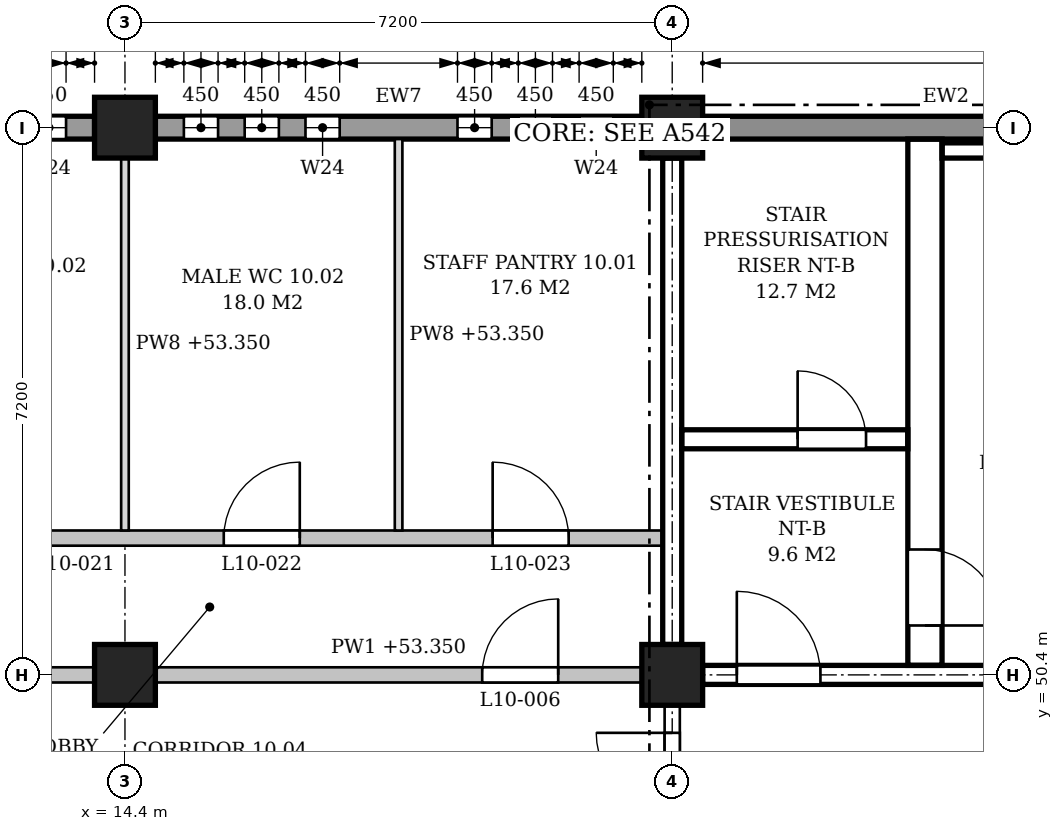
"""IFC4 building model, lengths in metres.
Left out: names, types, materials, properties, quantities, classifications, styles, units other than length and angle.
Written with IfcOpenShell. Run it as: python <this file> out.ifc"""

import sys

from ifc_helpers import new_model, si_unit, direction, frame, frame_2d, origin, origin_2d, place, context, subcontext, project, spatial, polyline, rectangle, outline, extrude, element, fill, save


model = new_model("IFC4")
c1 = context("Model", 3, precision=1e-05, world=origin(), true_north=direction((0.0, 1.0)))
c2 = subcontext(c1, "Body", "Model", "MODEL_VIEW")
j1 = project(units=[si_unit("LENGTHUNIT", "METRE"), si_unit("PLANEANGLEUNIT", "RADIAN")], contexts=[c1])
p1 = place(None, origin())
s1 = spatial("IfcSite", under=j1, at=p1, CompositionType="ELEMENT")
p2 = place(p1, origin())
s2 = spatial("IfcBuilding", under=s1, at=p2, CompositionType="ELEMENT")
p3 = place(p2, frame((0.0, 0.0, 49.8)))
s3 = spatial("IfcBuildingStorey", under=s2, at=p3, CompositionType="ELEMENT", Elevation=49.8)
for number, where, z_axis, x_axis in (
    (1, (14.4, 50.4, 0.0), (0.0, 0.0, 1.0), (1.0, 0.0, 0.0)),
    (2, (14.4, 57.6, 0.0), (0.0, 0.0, 1.0), (1.0, 0.0, 0.0)),
    (3, (21.6, 50.4, 0.0), (0.0, 0.0, 1.0), (1.0, 0.0, 0.0)),
    (4, (21.6, 57.6, 0.0), (0.0, 0.0, 1.0), (1.0, 0.0, 0.0)),
):
    element("IfcColumn", number, at=place(p3, frame(where, z_axis=z_axis, x_axis=x_axis)), inside=s3, PredefinedType="COLUMN", context=c2, shape_type="SweptSolid", body=[
        extrude(rectangle(XDim=0.8, YDim=0.8, at=origin_2d()), origin(), (0.0, 0.0, 1.0), 4.5),
    ])
p4 = place(p3, frame((28.4, 57.6, 0.0), z_axis=(0.0, 0.0, 1.0), x_axis=(-1.0, 0.0, 0.0)))
e5 = element("IfcWall", 5, at=p4, inside=s3, PredefinedType="STANDARD", context=c2, shape_type="SweptSolid", body=[
    extrude(rectangle(XDim=6.4, YDim=0.3, at=frame_2d((3.2, 0.0))), origin(), (0.0, 0.0, 1.0), 3.6),
])
p5 = place(p4, frame((0.95, 0.0, 0.9)))
e6 = element("IfcOpeningElement", 6, at=p5, cuts=e5, PredefinedType="OPENING", context=c2, shape_type="SweptSolid", body=[
    extrude(outline(polyline([(0.0, 0.0), (0.9, 0.0), (0.9, 2.15), (0.45, 2.6), (0.0, 2.15), (0.0, 0.0)])), frame((0.0, 0.16, 0.0), z_axis=(0.0, -1.0, 0.0), x_axis=(1.0, 0.0, 0.0)), (0.0, 0.0, 1.0), 0.32),
])
p6 = place(p3, frame((21.2, 57.6, 0.0), z_axis=(0.0, 0.0, 1.0), x_axis=(-1.0, 0.0, 0.0)))
e7 = element("IfcWall", 7, at=p6, inside=s3, PredefinedType="STANDARD", context=c2, shape_type="SweptSolid", body=[
    extrude(rectangle(XDim=6.4, YDim=0.3, at=frame_2d((3.2, 0.0))), origin(), (0.0, 0.0, 1.0), 3.6),
])
p7 = place(p6, frame((0.375, 0.0, 0.9)))
e8 = element("IfcOpeningElement", 8, at=p7, cuts=e7, PredefinedType="OPENING", context=c2, shape_type="SweptSolid", body=[
    extrude(outline(polyline([(0.0, 0.0), (0.45, 0.0), (0.45, 2.35), (0.225, 2.6), (0.0, 2.35), (0.0, 0.0)])), frame((0.0, 0.16, 0.0), z_axis=(0.0, -1.0, 0.0), x_axis=(1.0, 0.0, 0.0)), (0.0, 0.0, 1.0), 0.32),
])
p8 = place(p6, frame((1.175, 0.0, 0.9)))
e9 = element("IfcOpeningElement", 9, at=p8, cuts=e7, PredefinedType="OPENING", context=c2, shape_type="SweptSolid", body=[
    extrude(outline(polyline([(0.0, 0.0), (0.45, 0.0), (0.45, 2.35), (0.225, 2.6), (0.0, 2.35), (0.0, 0.0)])), frame((0.0, 0.16, 0.0), z_axis=(0.0, -1.0, 0.0), x_axis=(1.0, 0.0, 0.0)), (0.0, 0.0, 1.0), 0.32),
])
p9 = place(p6, frame((1.975, 0.0, 0.9)))
e10 = element("IfcOpeningElement", 10, at=p9, cuts=e7, PredefinedType="OPENING", context=c2, shape_type="SweptSolid", body=[
    extrude(outline(polyline([(0.0, 0.0), (0.45, 0.0), (0.45, 2.35), (0.225, 2.6), (0.0, 2.35), (0.0, 0.0)])), frame((0.0, 0.16, 0.0), z_axis=(0.0, -1.0, 0.0), x_axis=(1.0, 0.0, 0.0)), (0.0, 0.0, 1.0), 0.32),
])
p10 = place(p6, frame((3.975, 0.0, 0.9)))
e11 = element("IfcOpeningElement", 11, at=p10, cuts=e7, PredefinedType="OPENING", context=c2, shape_type="SweptSolid", body=[
    extrude(outline(polyline([(0.0, 0.0), (0.45, 0.0), (0.45, 2.35), (0.225, 2.6), (0.0, 2.35), (0.0, 0.0)])), frame((0.0, 0.16, 0.0), z_axis=(0.0, -1.0, 0.0), x_axis=(1.0, 0.0, 0.0)), (0.0, 0.0, 1.0), 0.32),
])
p11 = place(p6, frame((4.775, 0.0, 0.9)))
e12 = element("IfcOpeningElement", 12, at=p11, cuts=e7, PredefinedType="OPENING", context=c2, shape_type="SweptSolid", body=[
    extrude(outline(polyline([(0.0, 0.0), (0.45, 0.0), (0.45, 2.35), (0.225, 2.6), (0.0, 2.35), (0.0, 0.0)])), frame((0.0, 0.16, 0.0), z_axis=(0.0, -1.0, 0.0), x_axis=(1.0, 0.0, 0.0)), (0.0, 0.0, 1.0), 0.32),
])
p12 = place(p6, frame((5.575, 0.0, 0.9)))
e13 = element("IfcOpeningElement", 13, at=p12, cuts=e7, PredefinedType="OPENING", context=c2, shape_type="SweptSolid", body=[
    extrude(outline(polyline([(0.0, 0.0), (0.45, 0.0), (0.45, 2.35), (0.225, 2.6), (0.0, 2.35), (0.0, 0.0)])), frame((0.0, 0.16, 0.0), z_axis=(0.0, -1.0, 0.0), x_axis=(1.0, 0.0, 0.0)), (0.0, 0.0, 1.0), 0.32),
])
p13 = place(p3, frame((14.0, 57.6, 0.0), z_axis=(0.0, 0.0, 1.0), x_axis=(-1.0, 0.0, 0.0)))
e14 = element("IfcWall", 14, at=p13, inside=s3, PredefinedType="STANDARD", context=c2, shape_type="SweptSolid", body=[
    extrude(rectangle(XDim=6.4, YDim=0.3, at=frame_2d((3.2, 0.0))), origin(), (0.0, 0.0, 1.0), 3.6),
])
p14 = place(p13, frame((0.375, 0.0, 0.9)))
e15 = element("IfcOpeningElement", 15, at=p14, cuts=e14, PredefinedType="OPENING", context=c2, shape_type="SweptSolid", body=[
    extrude(outline(polyline([(0.0, 0.0), (0.45, 0.0), (0.45, 2.35), (0.225, 2.6), (0.0, 2.35), (0.0, 0.0)])), frame((0.0, 0.16, 0.0), z_axis=(0.0, -1.0, 0.0), x_axis=(1.0, 0.0, 0.0)), (0.0, 0.0, 1.0), 0.32),
])
p15 = place(p13, frame((1.175, 0.0, 0.9)))
e16 = element("IfcOpeningElement", 16, at=p15, cuts=e14, PredefinedType="OPENING", context=c2, shape_type="SweptSolid", body=[
    extrude(outline(polyline([(0.0, 0.0), (0.45, 0.0), (0.45, 2.35), (0.225, 2.6), (0.0, 2.35), (0.0, 0.0)])), frame((0.0, 0.16, 0.0), z_axis=(0.0, -1.0, 0.0), x_axis=(1.0, 0.0, 0.0)), (0.0, 0.0, 1.0), 0.32),
])
p16 = place(p13, frame((1.975, 0.0, 0.9)))
e17 = element("IfcOpeningElement", 17, at=p16, cuts=e14, PredefinedType="OPENING", context=c2, shape_type="SweptSolid", body=[
    extrude(outline(polyline([(0.0, 0.0), (0.45, 0.0), (0.45, 2.35), (0.225, 2.6), (0.0, 2.35), (0.0, 0.0)])), frame((0.0, 0.16, 0.0), z_axis=(0.0, -1.0, 0.0), x_axis=(1.0, 0.0, 0.0)), (0.0, 0.0, 1.0), 0.32),
])
p17 = place(p13, frame((3.975, 0.0, 0.9)))
e18 = element("IfcOpeningElement", 18, at=p17, cuts=e14, PredefinedType="OPENING", context=c2, shape_type="SweptSolid", body=[
    extrude(outline(polyline([(0.0, 0.0), (0.45, 0.0), (0.45, 2.35), (0.225, 2.6), (0.0, 2.35), (0.0, 0.0)])), frame((0.0, 0.16, 0.0), z_axis=(0.0, -1.0, 0.0), x_axis=(1.0, 0.0, 0.0)), (0.0, 0.0, 1.0), 0.32),
])
p18 = place(p13, frame((4.775, 0.0, 0.9)))
e19 = element("IfcOpeningElement", 19, at=p18, cuts=e14, PredefinedType="OPENING", context=c2, shape_type="SweptSolid", body=[
    extrude(outline(polyline([(0.0, 0.0), (0.45, 0.0), (0.45, 2.35), (0.225, 2.6), (0.0, 2.35), (0.0, 0.0)])), frame((0.0, 0.16, 0.0), z_axis=(0.0, -1.0, 0.0), x_axis=(1.0, 0.0, 0.0)), (0.0, 0.0, 1.0), 0.32),
])
p19 = place(p13, frame((5.575, 0.0, 0.9)))
e20 = element("IfcOpeningElement", 20, at=p19, cuts=e14, PredefinedType="OPENING", context=c2, shape_type="SweptSolid", body=[
    extrude(outline(polyline([(0.0, 0.0), (0.45, 0.0), (0.45, 2.35), (0.225, 2.6), (0.0, 2.35), (0.0, 0.0)])), frame((0.0, 0.16, 0.0), z_axis=(0.0, -1.0, 0.0), x_axis=(1.0, 0.0, 0.0)), (0.0, 0.0, 1.0), 0.32),
])
p20 = place(p3, frame((22.0, 50.4, 0.0), z_axis=(0.0, 0.0, 1.0), x_axis=(1.0, 0.0, 0.0)))
e21 = element("IfcWall", 21, at=p20, inside=s3, PredefinedType="SHEAR", context=c2, shape_type="SweptSolid", body=[
    extrude(rectangle(XDim=6.4, YDim=0.25, at=frame_2d((3.2, 0.0))), origin(), (0.0, 0.0, 1.0), 3.55),
])
p21 = place(p20, frame((0.45, 0.0, 0.0)))
e22 = element("IfcOpeningElement", 22, at=p21, cuts=e21, PredefinedType="OPENING", context=c2, shape_type="SweptSolid", body=[
    extrude(rectangle(XDim=1.1, YDim=2.1, at=frame_2d((0.55, 1.05))), frame((0.0, 0.135, 0.0), z_axis=(0.0, -1.0, 0.0), x_axis=(1.0, 0.0, 0.0)), (0.0, 0.0, 1.0), 0.27),
])
p22 = place(p3, frame((21.6, 50.8, 0.0), z_axis=(0.0, 0.0, 1.0), x_axis=(0.0, 1.0, 0.0)))
e23 = element("IfcWall", 23, at=p22, inside=s3, PredefinedType="SHEAR", context=c2, shape_type="SweptSolid", body=[
    extrude(rectangle(XDim=6.4, YDim=0.25, at=frame_2d((3.2, 0.0))), origin(), (0.0, 0.0, 1.0), 3.55),
])
p23 = place(p3, frame((25.15, 57.3, -0.25), z_axis=(0.0, 0.0, 1.0), x_axis=(1.0, 0.0, 0.0)))
e24 = element("IfcWall", 24, at=p23, inside=s3, PredefinedType="SHEAR", context=c2, shape_type="SweptSolid", body=[
    extrude(rectangle(XDim=1.4, YDim=0.2, at=frame_2d((0.7, 0.0))), origin(), (0.0, 0.0, 1.0), 4.45),
])
p24 = place(p3, frame((24.925, 50.525, 0.0), z_axis=(0.0, 0.0, 1.0), x_axis=(0.0, 1.0, 0.0)))
e25 = element("IfcWall", 25, at=p24, inside=s3, PredefinedType="SHEAR", context=c2, shape_type="SweptSolid", body=[
    extrude(rectangle(XDim=6.925, YDim=0.45, at=frame_2d((3.462, 0.0))), origin(), (0.0, 0.0, 1.0), 4.2),
])
p25 = place(p24, frame((0.525, 0.0, 0.0)))
e26 = element("IfcOpeningElement", 26, at=p25, cuts=e25, PredefinedType="OPENING", context=c2, shape_type="SweptSolid", body=[
    extrude(rectangle(XDim=1.0, YDim=2.1, at=frame_2d((0.5, 1.05))), frame((0.0, 0.235, 0.0), z_axis=(0.0, -1.0, 0.0), x_axis=(1.0, 0.0, 0.0)), (0.0, 0.0, 1.0), 0.47),
])
p26 = place(p3, frame((21.725, 53.5, 0.0), z_axis=(0.0, 0.0, 1.0), x_axis=(1.0, 0.0, 0.0)))
e27 = element("IfcWall", 27, at=p26, inside=s3, PredefinedType="SHEAR", context=c2, shape_type="SweptSolid", body=[
    extrude(rectangle(XDim=2.975, YDim=0.25, at=frame_2d((1.487, 0.0))), origin(), (0.0, 0.0, 1.0), 4.2),
])
p27 = place(p26, frame((1.525, 0.0, 0.0)))
e28 = element("IfcOpeningElement", 28, at=p27, cuts=e27, PredefinedType="OPENING", context=c2, shape_type="SweptSolid", body=[
    extrude(rectangle(XDim=0.9, YDim=2.1, at=frame_2d((0.45, 1.05))), frame((0.0, 0.135, 0.0), z_axis=(0.0, -1.0, 0.0), x_axis=(1.0, 0.0, 0.0)), (0.0, 0.0, 1.0), 0.27),
])
p28 = place(p3, frame((7.6, 50.4, 0.0), z_axis=(0.0, 0.0, 1.0), x_axis=(1.0, 0.0, 0.0)))
e29 = element("IfcWall", 29, at=p28, inside=s3, PredefinedType="PARTITIONING", context=c2, shape_type="SweptSolid", body=[
    extrude(rectangle(XDim=6.4, YDim=0.2, at=frame_2d((3.2, 0.0))), origin(), (0.0, 0.0, 1.0), 3.55),
])
p29 = place(p28, frame((2.7, 0.0, 0.0)))
e30 = element("IfcOpeningElement", 30, at=p29, cuts=e29, PredefinedType="OPENING", context=c2, shape_type="SweptSolid", body=[
    extrude(rectangle(XDim=1.0, YDim=2.1, at=frame_2d((0.5, 1.05))), frame((0.0, 0.11, 0.0), z_axis=(0.0, -1.0, 0.0), x_axis=(1.0, 0.0, 0.0)), (0.0, 0.0, 1.0), 0.22),
])
p30 = place(p3, frame((14.8, 50.4, 0.0), z_axis=(0.0, 0.0, 1.0), x_axis=(1.0, 0.0, 0.0)))
e31 = element("IfcWall", 31, at=p30, inside=s3, PredefinedType="PARTITIONING", context=c2, shape_type="SweptSolid", body=[
    extrude(rectangle(XDim=6.4, YDim=0.2, at=frame_2d((3.2, 0.0))), origin(), (0.0, 0.0, 1.0), 3.55),
])
p31 = place(p30, frame((4.3, 0.0, 0.0)))
e32 = element("IfcOpeningElement", 32, at=p31, cuts=e31, PredefinedType="OPENING", context=c2, shape_type="SweptSolid", body=[
    extrude(rectangle(XDim=1.0, YDim=2.1, at=frame_2d((0.5, 1.05))), frame((0.0, 0.11, 0.0), z_axis=(0.0, -1.0, 0.0), x_axis=(1.0, 0.0, 0.0)), (0.0, 0.0, 1.0), 0.22),
])
p32 = place(p3, frame((7.325, 52.2, 0.0), z_axis=(0.0, 0.0, 1.0), x_axis=(1.0, 0.0, 0.0)))
e33 = element("IfcWall", 33, at=p32, inside=s3, PredefinedType="PARTITIONING", context=c2, shape_type="SweptSolid", body=[
    extrude(outline(polyline([(0.0, 0.0), (14.15, 0.0), (14.15, 3.55), (14.05, 3.55), (14.05, 4.2), (7.3, 4.2), (7.3, 3.55), (6.85, 3.55), (6.85, 4.2), (0.1, 4.2), (0.1, 3.55), (0.0, 3.55), (0.0, 0.0)])), frame((0.0, 0.1, 0.0), z_axis=(0.0, -1.0, 0.0), x_axis=(1.0, 0.0, 0.0)), (0.0, 0.0, 1.0), 0.2),
])
p33 = place(p32, frame((1.238, 0.0, 0.0)))
e34 = element("IfcOpeningElement", 34, at=p33, cuts=e33, PredefinedType="OPENING", context=c2, shape_type="SweptSolid", body=[
    extrude(rectangle(XDim=1.0, YDim=2.1, at=frame_2d((0.5, 1.05))), frame((0.0, 0.11, 0.0), z_axis=(0.0, -1.0, 0.0), x_axis=(1.0, 0.0, 0.0)), (0.0, 0.0, 1.0), 0.22),
])
p34 = place(p32, frame((4.775, 0.0, 0.0)))
e35 = element("IfcOpeningElement", 35, at=p34, cuts=e33, PredefinedType="OPENING", context=c2, shape_type="SweptSolid", body=[
    extrude(rectangle(XDim=1.0, YDim=2.1, at=frame_2d((0.5, 1.05))), frame((0.0, 0.11, 0.0), z_axis=(0.0, -1.0, 0.0), x_axis=(1.0, 0.0, 0.0)), (0.0, 0.0, 1.0), 0.22),
])
p35 = place(p32, frame((8.375, 0.0, 0.0)))
e36 = element("IfcOpeningElement", 36, at=p35, cuts=e33, PredefinedType="OPENING", context=c2, shape_type="SweptSolid", body=[
    extrude(rectangle(XDim=1.0, YDim=2.1, at=frame_2d((0.5, 1.05))), frame((0.0, 0.11, 0.0), z_axis=(0.0, -1.0, 0.0), x_axis=(1.0, 0.0, 0.0)), (0.0, 0.0, 1.0), 0.22),
])
p36 = place(p32, frame((11.913, 0.0, 0.0)))
e37 = element("IfcOpeningElement", 37, at=p36, cuts=e33, PredefinedType="OPENING", context=c2, shape_type="SweptSolid", body=[
    extrude(rectangle(XDim=1.0, YDim=2.1, at=frame_2d((0.5, 1.05))), frame((0.0, 0.11, 0.0), z_axis=(0.0, -1.0, 0.0), x_axis=(1.0, 0.0, 0.0)), (0.0, 0.0, 1.0), 0.22),
])
p37 = place(p3, frame((14.4, 52.3, 0.0), z_axis=(0.0, 0.0, 1.0), x_axis=(0.0, 1.0, 0.0)))
e38 = element("IfcWall", 38, at=p37, inside=s3, PredefinedType="PARTITIONING", context=c2, shape_type="SweptSolid", body=[
    extrude(rectangle(XDim=4.9, YDim=0.1, at=frame_2d((2.45, 0.0))), origin(), (0.0, 0.0, 1.0), 3.55),
])
p38 = place(p3, frame((18.0, 52.3, 0.0), z_axis=(0.0, 0.0, 1.0), x_axis=(0.0, 1.0, 0.0)))
e39 = element("IfcWall", 39, at=p38, inside=s3, PredefinedType="PARTITIONING", context=c2, shape_type="SweptSolid", body=[
    extrude(rectangle(XDim=5.15, YDim=0.1, at=frame_2d((2.575, 0.0))), origin(), (0.0, 0.0, 1.0), 3.55),
])
p39 = place(p3, frame((21.6, 47.275, 0.0), z_axis=(0.0, 0.0, 1.0), x_axis=(0.0, 1.0, 0.0)))
e40 = element("IfcWall", 40, at=p39, inside=s3, PredefinedType="PARTITIONING", context=c2, shape_type="SweptSolid", body=[
    extrude(rectangle(XDim=2.725, YDim=0.2, at=frame_2d((1.363, 0.0))), origin(), (0.0, 0.0, 1.0), 3.55),
])
p40 = place(p39, frame((0.363, 0.0, 0.0)))
e41 = element("IfcOpeningElement", 41, at=p40, cuts=e40, PredefinedType="OPENING", context=c2, shape_type="SweptSolid", body=[
    extrude(rectangle(XDim=2.0, YDim=2.4, at=frame_2d((1.0, 1.2))), frame((0.0, 0.11, 0.0), z_axis=(0.0, -1.0, 0.0), x_axis=(1.0, 0.0, 0.0)), (0.0, 0.0, 1.0), 0.22),
])
p41 = place(p7, origin())
e42 = element("IfcWindow", 42, at=p41, inside=s3, PartitioningType="SINGLE_PANEL", PredefinedType="WINDOW", context=c2, shape_type="SweptSolid", body=[
    extrude(outline(polyline([(0.0, 0.0), (0.45, 0.0), (0.45, 2.35), (0.225, 2.6), (0.0, 2.35), (0.0, 0.0)])), frame((0.0, 0.03, 0.0), z_axis=(0.0, -1.0, 0.0), x_axis=(1.0, 0.0, 0.0)), (0.0, 0.0, 1.0), 0.06),
])
fill(e8, e42)
p42 = place(p8, origin())
e43 = element("IfcWindow", 43, at=p42, inside=s3, PartitioningType="SINGLE_PANEL", PredefinedType="WINDOW", context=c2, shape_type="SweptSolid", body=[
    extrude(outline(polyline([(0.0, 0.0), (0.45, 0.0), (0.45, 2.35), (0.225, 2.6), (0.0, 2.35), (0.0, 0.0)])), frame((0.0, 0.03, 0.0), z_axis=(0.0, -1.0, 0.0), x_axis=(1.0, 0.0, 0.0)), (0.0, 0.0, 1.0), 0.06),
])
fill(e9, e43)
p43 = place(p9, origin())
e44 = element("IfcWindow", 44, at=p43, inside=s3, PartitioningType="SINGLE_PANEL", PredefinedType="WINDOW", context=c2, shape_type="SweptSolid", body=[
    extrude(outline(polyline([(0.0, 0.0), (0.45, 0.0), (0.45, 2.35), (0.225, 2.6), (0.0, 2.35), (0.0, 0.0)])), frame((0.0, 0.03, 0.0), z_axis=(0.0, -1.0, 0.0), x_axis=(1.0, 0.0, 0.0)), (0.0, 0.0, 1.0), 0.06),
])
fill(e10, e44)
p44 = place(p10, origin())
e45 = element("IfcWindow", 45, at=p44, inside=s3, PartitioningType="SINGLE_PANEL", PredefinedType="WINDOW", context=c2, shape_type="SweptSolid", body=[
    extrude(outline(polyline([(0.0, 0.0), (0.45, 0.0), (0.45, 2.35), (0.225, 2.6), (0.0, 2.35), (0.0, 0.0)])), frame((0.0, 0.03, 0.0), z_axis=(0.0, -1.0, 0.0), x_axis=(1.0, 0.0, 0.0)), (0.0, 0.0, 1.0), 0.06),
])
fill(e11, e45)
p45 = place(p11, origin())
e46 = element("IfcWindow", 46, at=p45, inside=s3, PartitioningType="SINGLE_PANEL", PredefinedType="WINDOW", context=c2, shape_type="SweptSolid", body=[
    extrude(outline(polyline([(0.0, 0.0), (0.45, 0.0), (0.45, 2.35), (0.225, 2.6), (0.0, 2.35), (0.0, 0.0)])), frame((0.0, 0.03, 0.0), z_axis=(0.0, -1.0, 0.0), x_axis=(1.0, 0.0, 0.0)), (0.0, 0.0, 1.0), 0.06),
])
fill(e12, e46)
p46 = place(p12, origin())
e47 = element("IfcWindow", 47, at=p46, inside=s3, PartitioningType="SINGLE_PANEL", PredefinedType="WINDOW", context=c2, shape_type="SweptSolid", body=[
    extrude(outline(polyline([(0.0, 0.0), (0.45, 0.0), (0.45, 2.35), (0.225, 2.6), (0.0, 2.35), (0.0, 0.0)])), frame((0.0, 0.03, 0.0), z_axis=(0.0, -1.0, 0.0), x_axis=(1.0, 0.0, 0.0)), (0.0, 0.0, 1.0), 0.06),
])
fill(e13, e47)
p47 = place(p14, origin())
e48 = element("IfcWindow", 48, at=p47, inside=s3, PartitioningType="SINGLE_PANEL", PredefinedType="WINDOW", context=c2, shape_type="SweptSolid", body=[
    extrude(outline(polyline([(0.0, 0.0), (0.45, 0.0), (0.45, 2.35), (0.225, 2.6), (0.0, 2.35), (0.0, 0.0)])), frame((0.0, 0.03, 0.0), z_axis=(0.0, -1.0, 0.0), x_axis=(1.0, 0.0, 0.0)), (0.0, 0.0, 1.0), 0.06),
])
fill(e15, e48)
p48 = place(p25, frame((1.0, 0.0, 0.0), z_axis=(0.0, 0.0, 1.0), x_axis=(-1.0, 0.0, 0.0)))
e49 = element("IfcDoor", 49, at=p48, inside=s3, OperationType="SINGLE_SWING_RIGHT", PredefinedType="DOOR", context=c2, shape_type="SweptSolid", body=[
    extrude(rectangle(XDim=1.0, YDim=2.1, at=frame_2d((0.5, 1.05))), frame((0.0, 0.025, 0.0), z_axis=(0.0, -1.0, 0.0), x_axis=(1.0, 0.0, 0.0)), (0.0, 0.0, 1.0), 0.05),
])
fill(e26, e49)
p49 = place(p21, origin())
e50 = element("IfcDoor", 50, at=p49, inside=s3, OperationType="SINGLE_SWING_LEFT", PredefinedType="DOOR", context=c2, shape_type="SweptSolid", body=[
    extrude(rectangle(XDim=1.1, YDim=2.1, at=frame_2d((0.55, 1.05))), frame((0.0, 0.025, 0.0), z_axis=(0.0, -1.0, 0.0), x_axis=(1.0, 0.0, 0.0)), (0.0, 0.0, 1.0), 0.05),
])
fill(e22, e50)
p50 = place(p27, origin())
e51 = element("IfcDoor", 51, at=p50, inside=s3, OperationType="SINGLE_SWING_LEFT", PredefinedType="DOOR", context=c2, shape_type="SweptSolid", body=[
    extrude(rectangle(XDim=0.9, YDim=2.1, at=frame_2d((0.45, 1.05))), frame((0.0, 0.025, 0.0), z_axis=(0.0, -1.0, 0.0), x_axis=(1.0, 0.0, 0.0)), (0.0, 0.0, 1.0), 0.05),
])
fill(e28, e51)
p51 = place(p40, origin())
e52 = element("IfcDoor", 52, at=p51, inside=s3, OperationType="DOUBLE_DOOR_SINGLE_SWING", PredefinedType="DOOR", context=c2, shape_type="SweptSolid", body=[
    extrude(rectangle(XDim=2.0, YDim=2.4, at=frame_2d((1.0, 1.2))), frame((0.0, 0.025, 0.0), z_axis=(0.0, -1.0, 0.0), x_axis=(1.0, 0.0, 0.0)), (0.0, 0.0, 1.0), 0.05),
])
fill(e41, e52)
p52 = place(p31, origin())
e53 = element("IfcDoor", 53, at=p52, inside=s3, OperationType="SINGLE_SWING_RIGHT", PredefinedType="DOOR", context=c2, shape_type="SweptSolid", body=[
    extrude(rectangle(XDim=1.0, YDim=2.1, at=frame_2d((0.5, 1.05))), frame((0.0, 0.025, 0.0), z_axis=(0.0, -1.0, 0.0), x_axis=(1.0, 0.0, 0.0)), (0.0, 0.0, 1.0), 0.05),
])
fill(e32, e53)
p53 = place(p35, origin())
e54 = element("IfcDoor", 54, at=p53, inside=s3, OperationType="SINGLE_SWING_RIGHT", PredefinedType="DOOR", context=c2, shape_type="SweptSolid", body=[
    extrude(rectangle(XDim=1.0, YDim=2.1, at=frame_2d((0.5, 1.05))), frame((0.0, 0.025, 0.0), z_axis=(0.0, -1.0, 0.0), x_axis=(1.0, 0.0, 0.0)), (0.0, 0.0, 1.0), 0.05),
])
fill(e36, e54)
p54 = place(p36, origin())
e55 = element("IfcDoor", 55, at=p54, inside=s3, OperationType="SINGLE_SWING_LEFT", PredefinedType="DOOR", context=c2, shape_type="SweptSolid", body=[
    extrude(rectangle(XDim=1.0, YDim=2.1, at=frame_2d((0.5, 1.05))), frame((0.0, 0.025, 0.0), z_axis=(0.0, -1.0, 0.0), x_axis=(1.0, 0.0, 0.0)), (0.0, 0.0, 1.0), 0.05),
])
fill(e37, e55)
save(model, sys.argv[1])
